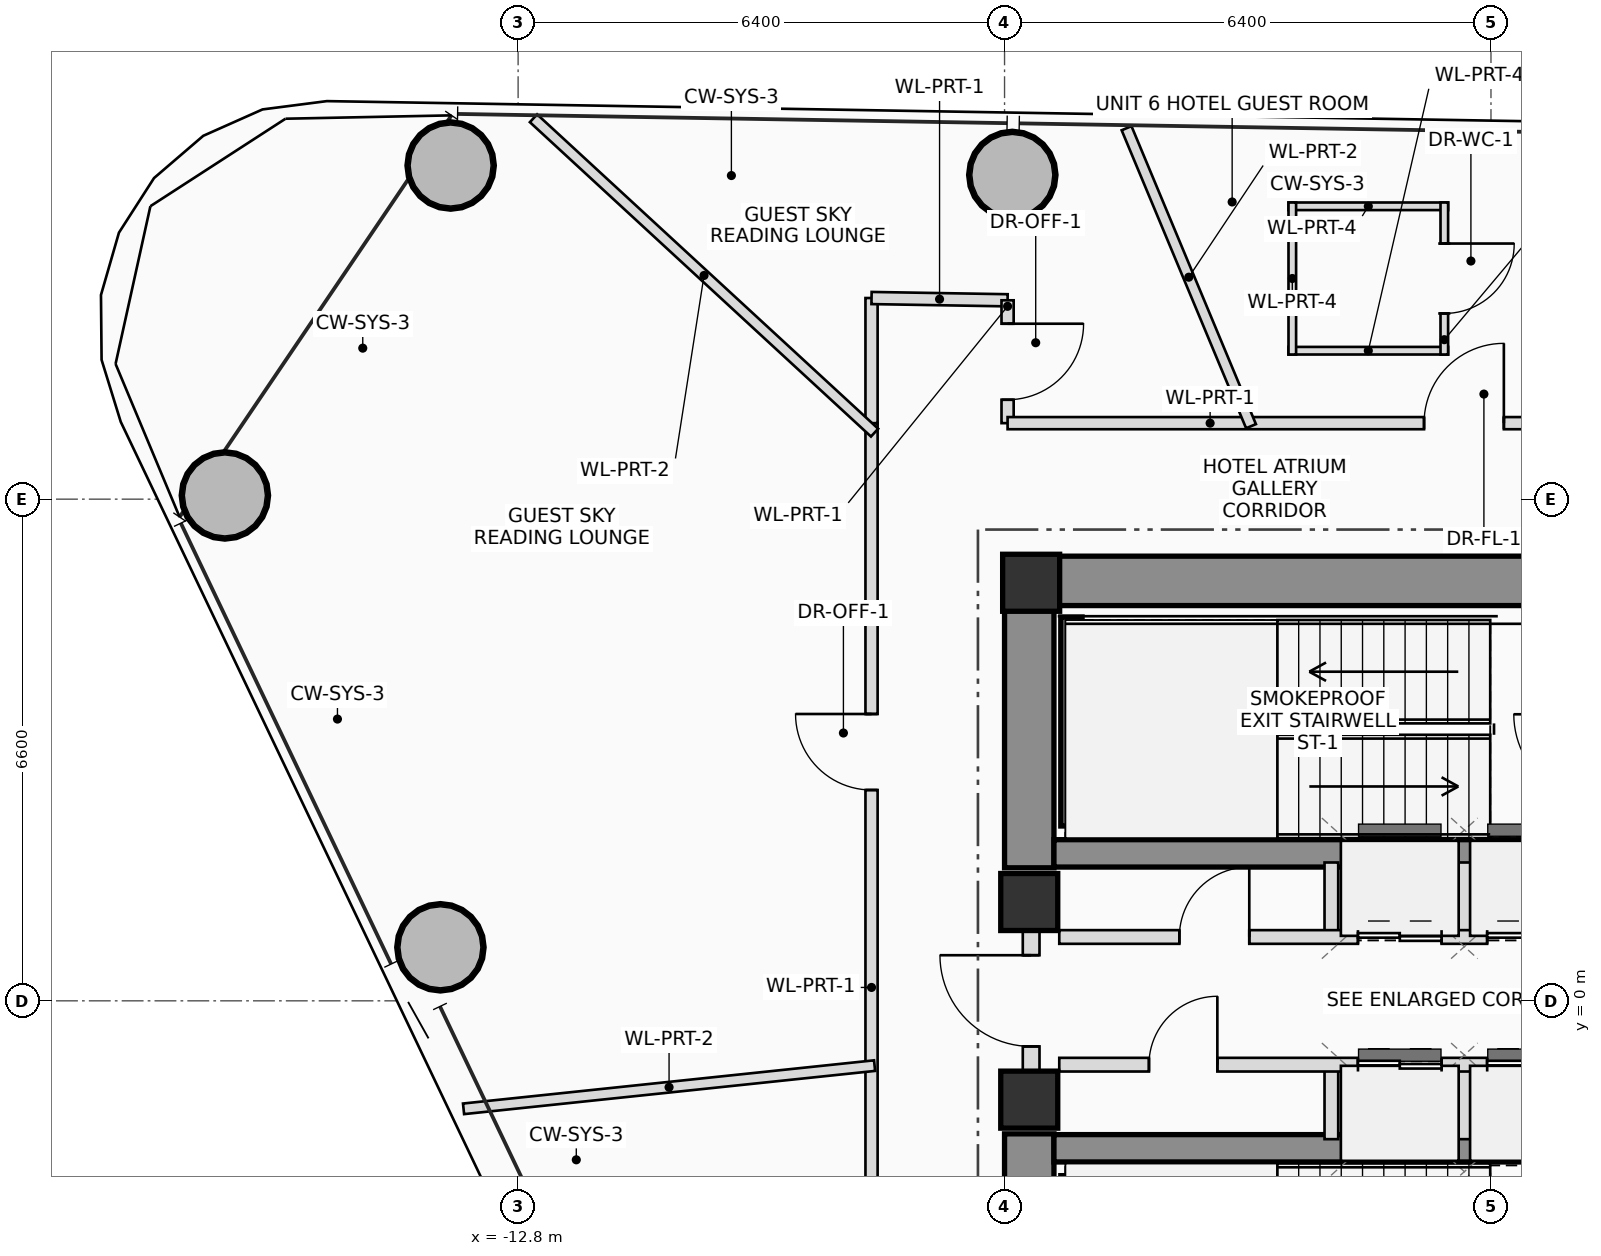
"""IFC4 building model, lengths in metres.
Left out: names, types, materials, properties, quantities, classifications, styles, units other than length and angle.
Written with IfcOpenShell. Run it as: python <this file> out.ifc"""

import sys

from ifc_helpers import new_model, si_unit, direction, frame, frame_2d, origin, origin_2d, place, context, subcontext, project, spatial, rectangle, hollow_circle, extrude, source, transform, mapped, element, fill, save


model = new_model("IFC4")
c1 = context("Model", 3, precision=1e-05, world=origin(), true_north=direction((0.0, 1.0)))
c2 = subcontext(c1, "Body", "Model", "MODEL_VIEW")
j1 = project(units=[si_unit("LENGTHUNIT", "METRE"), si_unit("PLANEANGLEUNIT", "RADIAN")], contexts=[c1])
p1 = place(None, origin())
s1 = spatial("IfcSite", under=j1, at=p1, CompositionType="ELEMENT")
p2 = place(p1, origin())
s2 = spatial("IfcBuilding", under=s1, at=p2, CompositionType="ELEMENT")
p3 = place(p2, frame((0.0, 0.0, 215.6)))
s3 = spatial("IfcBuildingStorey", under=s2, at=p3, CompositionType="ELEMENT", Elevation=215.6)
m1 = source(origin(), c2, "Body", "SweptSolid", [
    extrude(rectangle(XDim=0.75, YDim=0.75, at=origin_2d()), origin(), (0.0, 0.0, 1.0), 3.45),
])
p4 = place(p3, frame((-6.05, 5.5, 0.0), z_axis=(0.0, 0.0, 1.0), x_axis=(1.0, 0.0, 0.0)))
e1 = element("IfcColumn", 1, at=p4, inside=s3, PredefinedType="COLUMN", context=c2, shape_type="MappedRepresentation", body=[
    mapped(m1, transform((0.0, 0.0, 0.0), scale=1.0)),
])
p5 = place(p3, frame((-6.4, 5.525, 0.0), z_axis=(0.0, 0.0, 1.0), x_axis=(1.0, 0.0, 0.0)))
e2 = element("IfcWall", 2, at=p5, inside=s3, PredefinedType="SHEAR", context=c2, shape_type="SweptSolid", body=[
    extrude(rectangle(XDim=12.8, YDim=0.65, at=frame_2d((6.4, 0.0))), origin(), (0.0, 0.0, 1.0), 3.45),
])
p6 = place(p5, frame((8.6, 0.0, 0.0)))
e3 = element("IfcOpeningElement", 3, at=p6, cuts=e2, PredefinedType="OPENING", context=c2, shape_type="SweptSolid", body=[
    extrude(rectangle(XDim=1.2, YDim=2.2, at=frame_2d((0.6, 1.1))), frame((0.0, 0.335, 0.0), z_axis=(0.0, -1.0, 0.0), x_axis=(1.0, 0.0, 0.0)), (0.0, 0.0, 1.0), 0.67),
])
for number, where, z_axis, x_axis in (
    (4, (-6.075, -5.2, 0.0), (0.0, 0.0, 1.0), (0.0, 1.0, 0.0)),
    (5, (-6.075, 1.75, 0.0), (0.0, 0.0, 1.0), (0.0, 1.0, 0.0)),
):
    element("IfcWall", number, at=place(p3, frame(where, z_axis=z_axis, x_axis=x_axis)), inside=s3, PredefinedType="SHEAR", context=c2, shape_type="SweptSolid", body=[
        extrude(rectangle(XDim=3.45, YDim=0.65, at=frame_2d((1.725, 0.0))), origin(), (0.0, 0.0, 1.0), 3.45),
    ])
for number, where, z_axis, x_axis in (
    (6, (-5.75, 1.94, 0.0), (0.0, 0.0, 1.0), (1.0, 0.0, 0.0)),
    (7, (-5.75, -1.94, 0.0), (0.0, 0.0, 1.0), (1.0, 0.0, 0.0)),
):
    element("IfcWall", number, at=place(p3, frame(where, z_axis=z_axis, x_axis=x_axis)), inside=s3, PredefinedType="SHEAR", context=c2, shape_type="SweptSolid", body=[
        extrude(rectangle(XDim=11.5, YDim=0.36, at=frame_2d((5.75, 0.0))), origin(), (0.0, 0.0, 1.0), 3.45),
    ])
p7 = place(p3, frame((-5.52, 2.3, 0.0), z_axis=(0.0, 0.0, 1.0), x_axis=(0.0, 1.0, 0.0)))
e8 = element("IfcWall", 8, at=p7, inside=s3, PredefinedType="SHEAR", context=c2, shape_type="SweptSolid", body=[
    extrude(rectangle(XDim=2.75, YDim=0.28, at=frame_2d((1.375, 0.0))), origin(), (0.0, 0.0, 1.0), 3.45),
])
for number, where, z_axis, x_axis in (
    (9, (-6.075, -1.3, 0.0), (0.0, 0.0, 1.0), (1.0, 0.0, 0.0)),
    (10, (-6.075, 1.3, 0.0), (0.0, 0.0, 1.0), (1.0, 0.0, 0.0)),
):
    element("IfcColumn", number, at=place(p3, frame(where, z_axis=z_axis, x_axis=x_axis)), inside=s3, PredefinedType="COLUMN", context=c2, shape_type="MappedRepresentation", body=[
        mapped(m1, transform((0.0, 0.0, 0.0), scale=1.0)),
    ])
m2 = source(origin(), c2, "Body", "SweptSolid", [
    extrude(hollow_circle(Radius=0.575, WallThickness=0.042, at=origin_2d()), origin(), (0.0, 0.0, 1.0), 3.45),
])
for number, where, z_axis, x_axis in (
    (11, (-6.298, 10.865, 0.0), (0.0, 0.0, 1.0), (1.0, 0.0, 0.0)),
    (12, (-13.688, 10.99, 0.0), (0.0, 0.0, 1.0), (1.0, 0.0, 0.0)),
    (13, (-16.658, 6.649, 0.0), (0.0, 0.0, 1.0), (1.0, 0.0, 0.0)),
    (14, (-13.823, 0.704, 0.0), (0.0, 0.0, 1.0), (1.0, 0.0, 0.0)),
):
    element("IfcColumn", number, at=place(p3, frame(where, z_axis=z_axis, x_axis=x_axis)), inside=s3, PredefinedType="COLUMN", context=c2, shape_type="MappedRepresentation", body=[
        mapped(m2, transform((0.0, 0.0, 0.0), scale=1.0)),
    ])
p8 = place(p3, frame((-6.05, -0.95, 0.0), z_axis=(0.0, 0.0, 1.0), x_axis=(0.0, 1.0, 0.0)))
e15 = element("IfcWall", 15, at=p8, inside=s3, PredefinedType="PLUMBINGWALL", context=c2, shape_type="SweptSolid", body=[
    extrude(rectangle(XDim=1.9, YDim=0.22, at=frame_2d((0.95, 0.0))), origin(), (0.0, 0.0, 1.0), 2.19),
])
p9 = place(p8, frame((0.35, 0.0, 0.0)))
e16 = element("IfcOpeningElement", 16, at=p9, cuts=e15, PredefinedType="OPENING", context=c2, shape_type="SweptSolid", body=[
    extrude(rectangle(XDim=1.2, YDim=2.2, at=frame_2d((0.6, 1.1))), frame((0.0, 0.12, 0.0), z_axis=(0.0, -1.0, 0.0), x_axis=(1.0, 0.0, 0.0)), (0.0, 0.0, 1.0), 0.24),
])
for number, where, z_axis, x_axis in (
    (17, (-2.1, 0.84, 0.0), (0.0, 0.0, 1.0), (0.0, 1.0, 0.0)),
    (18, (-2.1, -1.82, 0.0), (0.0, 0.0, 1.0), (0.0, 1.0, 0.0)),
    (19, (-0.35, 0.84, 0.0), (0.0, 0.0, 1.0), (0.0, 1.0, 0.0)),
    (20, (-0.35, -1.82, 0.0), (0.0, 0.0, 1.0), (0.0, 1.0, 0.0)),
):
    element("IfcWall", number, at=place(p3, frame(where, z_axis=z_axis, x_axis=x_axis)), inside=s3, PredefinedType="PLUMBINGWALL", context=c2, shape_type="SweptSolid", body=[
        extrude(rectangle(XDim=0.98, YDim=0.18, at=frame_2d((0.49, 0.0))), origin(), (0.0, 0.0, 1.0), 3.21),
    ])
p10 = place(p3, frame((-5.68, 0.84, 0.0), z_axis=(0.0, 0.0, 1.0), x_axis=(1.0, 0.0, 0.0)))
e21 = element("IfcWall", 21, at=p10, inside=s3, PredefinedType="PLUMBINGWALL", context=c2, shape_type="SweptSolid", body=[
    extrude(rectangle(XDim=11.33, YDim=0.18, at=frame_2d((5.665, 0.0))), origin(), (0.0, 0.0, 1.0), 3.21),
])
p11 = place(p10, frame((1.58, 0.0, 0.0)))
e22 = element("IfcOpeningElement", 22, at=p11, cuts=e21, PredefinedType="OPENING", context=c2, shape_type="SweptSolid", body=[
    extrude(rectangle(XDim=0.92, YDim=2.1, at=frame_2d((0.46, 1.05))), frame((0.0, 0.1, 0.0), z_axis=(0.0, -1.0, 0.0), x_axis=(1.0, 0.0, 0.0)), (0.0, 0.0, 1.0), 0.2),
])
p12 = place(p10, frame((3.93, 0.0, 0.0)))
e23 = element("IfcOpeningElement", 23, at=p12, cuts=e21, PredefinedType="OPENING", context=c2, shape_type="SweptSolid", body=[
    extrude(rectangle(XDim=1.1, YDim=2.2, at=frame_2d((0.55, 1.1))), frame((0.0, 0.1, 0.0), z_axis=(0.0, -1.0, 0.0), x_axis=(1.0, 0.0, 0.0)), (0.0, 0.0, 1.0), 0.2),
])
p13 = place(p10, frame((5.63, 0.0, 0.0)))
e24 = element("IfcOpeningElement", 24, at=p13, cuts=e21, PredefinedType="OPENING", context=c2, shape_type="SweptSolid", body=[
    extrude(rectangle(XDim=1.1, YDim=2.2, at=frame_2d((0.55, 1.1))), frame((0.0, 0.1, 0.0), z_axis=(0.0, -1.0, 0.0), x_axis=(1.0, 0.0, 0.0)), (0.0, 0.0, 1.0), 0.2),
])
p14 = place(p10, frame((10.25, 0.0, 0.0)))
e25 = element("IfcOpeningElement", 25, at=p14, cuts=e21, PredefinedType="OPENING", context=c2, shape_type="SweptSolid", body=[
    extrude(rectangle(XDim=0.9, YDim=2.05, at=frame_2d((0.45, 1.025))), frame((0.0, 0.1, 0.0), z_axis=(0.0, -1.0, 0.0), x_axis=(1.0, 0.0, 0.0)), (0.0, 0.0, 1.0), 0.2),
])
p15 = place(p3, frame((-5.68, -0.84, 0.0), z_axis=(0.0, 0.0, 1.0), x_axis=(1.0, 0.0, 0.0)))
e26 = element("IfcWall", 26, at=p15, inside=s3, PredefinedType="PLUMBINGWALL", context=c2, shape_type="SweptSolid", body=[
    extrude(rectangle(XDim=11.33, YDim=0.18, at=frame_2d((5.665, 0.0))), origin(), (0.0, 0.0, 1.0), 3.21),
])
p16 = place(p15, frame((1.18, 0.0, 0.0)))
e27 = element("IfcOpeningElement", 27, at=p16, cuts=e26, PredefinedType="OPENING", context=c2, shape_type="SweptSolid", body=[
    extrude(rectangle(XDim=0.9, YDim=2.05, at=frame_2d((0.45, 1.025))), frame((0.0, 0.1, 0.0), z_axis=(0.0, -1.0, 0.0), x_axis=(1.0, 0.0, 0.0)), (0.0, 0.0, 1.0), 0.2),
])
p17 = place(p15, frame((3.93, 0.0, 0.0)))
e28 = element("IfcOpeningElement", 28, at=p17, cuts=e26, PredefinedType="OPENING", context=c2, shape_type="SweptSolid", body=[
    extrude(rectangle(XDim=1.1, YDim=2.2, at=frame_2d((0.55, 1.1))), frame((0.0, 0.1, 0.0), z_axis=(0.0, -1.0, 0.0), x_axis=(1.0, 0.0, 0.0)), (0.0, 0.0, 1.0), 0.2),
])
p18 = place(p15, frame((5.63, 0.0, 0.0)))
e29 = element("IfcOpeningElement", 29, at=p18, cuts=e26, PredefinedType="OPENING", context=c2, shape_type="SweptSolid", body=[
    extrude(rectangle(XDim=1.1, YDim=2.2, at=frame_2d((0.55, 1.1))), frame((0.0, 0.1, 0.0), z_axis=(0.0, -1.0, 0.0), x_axis=(1.0, 0.0, 0.0)), (0.0, 0.0, 1.0), 0.2),
])
p19 = place(p15, frame((8.9, 0.0, 0.0)))
e30 = element("IfcOpeningElement", 30, at=p19, cuts=e26, PredefinedType="OPENING", context=c2, shape_type="SweptSolid", body=[
    extrude(rectangle(XDim=0.9, YDim=2.05, at=frame_2d((0.45, 1.025))), frame((0.0, 0.1, 0.0), z_axis=(0.0, -1.0, 0.0), x_axis=(1.0, 0.0, 0.0)), (0.0, 0.0, 1.0), 0.2),
])
p20 = place(p15, frame((10.25, 0.0, 0.0)))
e31 = element("IfcOpeningElement", 31, at=p20, cuts=e26, PredefinedType="OPENING", context=c2, shape_type="SweptSolid", body=[
    extrude(rectangle(XDim=0.9, YDim=2.05, at=frame_2d((0.45, 1.025))), frame((0.0, 0.1, 0.0), z_axis=(0.0, -1.0, 0.0), x_axis=(1.0, 0.0, 0.0)), (0.0, 0.0, 1.0), 0.2),
])
for number, where, z_axis, x_axis in (
    (32, (-2.664, 10.453, 0.0), (0.0, 0.0, 1.0), (1.0, 0.0, 0.0)),
    (33, (-0.564, 8.553, 0.0), (0.0, 0.0, 1.0), (-1.0, 0.0, 0.0)),
):
    element("IfcWall", number, at=place(p3, frame(where, z_axis=z_axis, x_axis=x_axis)), inside=s3, PredefinedType="PARTITIONING", context=c2, shape_type="SweptSolid", body=[
        extrude(rectangle(XDim=2.1, YDim=0.1, at=frame_2d((1.05, 0.0))), origin(), (0.0, 0.0, 1.0), 3.21),
    ])
p21 = place(p3, frame((-0.614, 10.503, 0.0), z_axis=(0.0, 0.0, 1.0), x_axis=(0.0, -1.0, 0.0)))
e34 = element("IfcWall", 34, at=p21, inside=s3, PredefinedType="PARTITIONING", context=c2, shape_type="SweptSolid", body=[
    extrude(rectangle(XDim=2.0, YDim=0.1, at=frame_2d((1.0, 0.0))), origin(), (0.0, 0.0, 1.0), 2.865),
])
p22 = place(p21, frame((0.54, 0.0, 0.0)))
e35 = element("IfcOpeningElement", 35, at=p22, cuts=e34, PredefinedType="OPENING", context=c2, shape_type="SweptSolid", body=[
    extrude(rectangle(XDim=0.92, YDim=2.1, at=frame_2d((0.46, 1.05))), frame((0.0, 0.06, 0.0), z_axis=(0.0, -1.0, 0.0), x_axis=(1.0, 0.0, 0.0)), (0.0, 0.0, 1.0), 0.12),
])
p23 = place(p3, frame((-2.614, 8.503, 0.0), z_axis=(0.0, 0.0, 1.0), x_axis=(0.0, 1.0, 0.0)))
e36 = element("IfcWall", 36, at=p23, inside=s3, PredefinedType="PARTITIONING", context=c2, shape_type="SweptSolid", body=[
    extrude(rectangle(XDim=2.0, YDim=0.1, at=frame_2d((1.0, 0.0))), origin(), (0.0, 0.0, 1.0), 2.865),
])
p24 = place(p3, frame((-8.15, -7.355, 0.0), z_axis=(0.0, 0.0, 1.0), x_axis=(0.0, 1.0, 0.0)))
e37 = element("IfcWall", 37, at=p24, inside=s3, PredefinedType="PARTITIONING", context=c2, shape_type="SweptSolid", body=[
    extrude(rectangle(XDim=14.956, YDim=0.16, at=frame_2d((7.478, 0.0))), origin(), (0.0, 0.0, 1.0), 2.565),
])
p25 = place(p24, frame((4.034, 0.0, 0.0)))
e38 = element("IfcOpeningElement", 38, at=p25, cuts=e37, PredefinedType="OPENING", context=c2, shape_type="SweptSolid", body=[
    extrude(rectangle(XDim=0.9, YDim=2.05, at=frame_2d((0.45, 1.025))), frame((0.0, 0.09, 0.0), z_axis=(0.0, -1.0, 0.0), x_axis=(1.0, 0.0, 0.0)), (0.0, 0.0, 1.0), 0.18),
])
p26 = place(p24, frame((10.129, 0.0, 0.0)))
e39 = element("IfcOpeningElement", 39, at=p26, cuts=e37, PredefinedType="OPENING", context=c2, shape_type="SweptSolid", body=[
    extrude(rectangle(XDim=1.0, YDim=2.25, at=frame_2d((0.5, 1.125))), frame((0.0, 0.09, 0.0), z_axis=(0.0, -1.0, 0.0), x_axis=(1.0, 0.0, 0.0)), (0.0, 0.0, 1.0), 0.18),
])
p27 = place(p3, frame((-8.15, 7.6, 0.0), z_axis=(0.0, 0.0, 1.0), x_axis=(0.0, 1.0, 0.0)))
e40 = element("IfcWall", 40, at=p27, inside=s3, PredefinedType="PARTITIONING", context=c2, shape_type="SweptSolid", body=[
    extrude(rectangle(XDim=1.646, YDim=0.16, at=frame_2d((0.823, 0.0))), origin(), (0.0, 0.0, 1.0), 2.765),
])
p28 = place(p3, frame((-8.15, 9.246, 0.0), z_axis=(0.0, 0.0, 1.0), x_axis=(0.999859277964, -0.016775704705, 0.0)))
e41 = element("IfcWall", 41, at=p28, inside=s3, PredefinedType="PARTITIONING", context=c2, shape_type="SweptSolid", body=[
    extrude(rectangle(XDim=1.79, YDim=0.16, at=frame_2d((0.895, 0.0))), origin(), (0.0, 0.0, 1.0), 2.865),
])
p29 = place(p3, frame((-6.36, 9.216, 0.0), z_axis=(0.0, 0.0, 1.0), x_axis=(0.0, -1.0, 0.0)))
e42 = element("IfcWall", 42, at=p29, inside=s3, PredefinedType="PARTITIONING", context=c2, shape_type="SweptSolid", body=[
    extrude(rectangle(XDim=1.616, YDim=0.16, at=frame_2d((0.808, 0.0))), origin(), (0.0, 0.0, 1.0), 2.565),
])
p30 = place(p29, frame((0.308, 0.0, 0.0)))
e43 = element("IfcOpeningElement", 43, at=p30, cuts=e42, PredefinedType="OPENING", context=c2, shape_type="SweptSolid", body=[
    extrude(rectangle(XDim=1.0, YDim=2.25, at=frame_2d((0.5, 1.125))), frame((0.0, 0.09, 0.0), z_axis=(0.0, -1.0, 0.0), x_axis=(1.0, 0.0, 0.0)), (0.0, 0.0, 1.0), 0.18),
])
p31 = place(p3, frame((-6.36, 7.6, 0.0), z_axis=(0.0, 0.0, 1.0), x_axis=(1.0, 0.0, 0.0)))
e44 = element("IfcWall", 44, at=p31, inside=s3, PredefinedType="PARTITIONING", context=c2, shape_type="SweptSolid", body=[
    extrude(rectangle(XDim=11.61, YDim=0.16, at=frame_2d((5.805, 0.0))), origin(), (0.0, 0.0, 1.0), 2.565),
])
p32 = place(p31, frame((5.479, 0.0, 0.0)))
e45 = element("IfcOpeningElement", 45, at=p32, cuts=e44, PredefinedType="OPENING", context=c2, shape_type="SweptSolid", body=[
    extrude(rectangle(XDim=1.05, YDim=2.2, at=frame_2d((0.525, 1.1))), frame((0.0, 0.09, 0.0), z_axis=(0.0, -1.0, 0.0), x_axis=(1.0, 0.0, 0.0)), (0.0, 0.0, 1.0), 0.18),
])
p33 = place(p31, frame((9.641, 0.0, 0.0)))
e46 = element("IfcOpeningElement", 46, at=p33, cuts=e44, PredefinedType="OPENING", context=c2, shape_type="SweptSolid", body=[
    extrude(rectangle(XDim=1.0, YDim=2.25, at=frame_2d((0.5, 1.125))), frame((0.0, 0.09, 0.0), z_axis=(0.0, -1.0, 0.0), x_axis=(1.0, 0.0, 0.0)), (0.0, 0.0, 1.0), 0.18),
])
p34 = place(p3, frame((-3.157, 7.56, 0.0), z_axis=(0.0, 0.0, 1.0), x_axis=(-0.38535788012, 0.922767199368, 0.0)))
e47 = element("IfcWall", 47, at=p34, inside=s3, PredefinedType="PARTITIONING", context=c2, shape_type="SweptSolid", body=[
    extrude(rectangle(XDim=4.249, YDim=0.14, at=frame_2d((2.124, 0.0))), origin(), (0.0, 0.0, 1.0), 2.725),
])
p35 = place(p3, frame((-8.11, 7.475, 0.0), z_axis=(0.0, 0.0, 1.0), x_axis=(-0.735323159751, 0.67771664487, 0.0)))
e48 = element("IfcWall", 48, at=p35, inside=s3, PredefinedType="PARTITIONING", context=c2, shape_type="SweptSolid", body=[
    extrude(rectangle(XDim=6.103, YDim=0.14, at=frame_2d((3.051, 0.0))), origin(), (0.0, 0.0, 1.0), 2.725),
])
p36 = place(p3, frame((-8.11, -0.852, 0.0), z_axis=(0.0, 0.0, 1.0), x_axis=(-0.994517501458, -0.104570260086, 0.0)))
e49 = element("IfcWall", 49, at=p36, inside=s3, PredefinedType="PARTITIONING", context=c2, shape_type="SweptSolid", body=[
    extrude(rectangle(XDim=5.438, YDim=0.14, at=frame_2d((2.719, 0.0))), origin(), (0.0, 0.0, 1.0), 2.725),
])
p37 = place(p9, origin())
e50 = element("IfcDoor", 50, at=p37, inside=s3, OperationType="SINGLE_SWING_RIGHT", PredefinedType="DOOR", context=c2, shape_type="SweptSolid", body=[
    extrude(rectangle(XDim=1.2, YDim=2.2, at=frame_2d((0.6, 1.1))), frame((0.0, 0.025, 0.0), z_axis=(0.0, -1.0, 0.0), x_axis=(1.0, 0.0, 0.0)), (0.0, 0.0, 1.0), 0.05),
])
fill(e16, e50)
p38 = place(p11, origin())
e51 = element("IfcDoor", 51, at=p38, inside=s3, OperationType="SINGLE_SWING_RIGHT", PredefinedType="DOOR", context=c2, shape_type="SweptSolid", body=[
    extrude(rectangle(XDim=0.92, YDim=2.1, at=frame_2d((0.46, 1.05))), frame((0.0, 0.025, 0.0), z_axis=(0.0, -1.0, 0.0), x_axis=(1.0, 0.0, 0.0)), (0.0, 0.0, 1.0), 0.05),
])
fill(e22, e51)
p39 = place(p12, origin())
e52 = element("IfcDoor", 52, at=p39, inside=s3, OperationType="DOUBLE_DOOR_SLIDING", PredefinedType="DOOR", context=c2, shape_type="SweptSolid", body=[
    extrude(rectangle(XDim=1.1, YDim=2.2, at=frame_2d((0.55, 1.1))), frame((0.0, 0.025, 0.0), z_axis=(0.0, -1.0, 0.0), x_axis=(1.0, 0.0, 0.0)), (0.0, 0.0, 1.0), 0.05),
])
fill(e23, e52)
p40 = place(p13, origin())
e53 = element("IfcDoor", 53, at=p40, inside=s3, OperationType="DOUBLE_DOOR_SLIDING", PredefinedType="DOOR", context=c2, shape_type="SweptSolid", body=[
    extrude(rectangle(XDim=1.1, YDim=2.2, at=frame_2d((0.55, 1.1))), frame((0.0, 0.025, 0.0), z_axis=(0.0, -1.0, 0.0), x_axis=(1.0, 0.0, 0.0)), (0.0, 0.0, 1.0), 0.05),
])
fill(e24, e53)
p41 = place(p16, origin())
e54 = element("IfcDoor", 54, at=p41, inside=s3, OperationType="SINGLE_SWING_RIGHT", PredefinedType="DOOR", context=c2, shape_type="SweptSolid", body=[
    extrude(rectangle(XDim=0.9, YDim=2.05, at=frame_2d((0.45, 1.025))), frame((0.0, 0.025, 0.0), z_axis=(0.0, -1.0, 0.0), x_axis=(1.0, 0.0, 0.0)), (0.0, 0.0, 1.0), 0.05),
])
fill(e27, e54)
p42 = place(p17, origin())
e55 = element("IfcDoor", 55, at=p42, inside=s3, OperationType="DOUBLE_DOOR_SLIDING", PredefinedType="DOOR", context=c2, shape_type="SweptSolid", body=[
    extrude(rectangle(XDim=1.1, YDim=2.2, at=frame_2d((0.55, 1.1))), frame((0.0, 0.025, 0.0), z_axis=(0.0, -1.0, 0.0), x_axis=(1.0, 0.0, 0.0)), (0.0, 0.0, 1.0), 0.05),
])
fill(e28, e55)
p43 = place(p18, origin())
e56 = element("IfcDoor", 56, at=p43, inside=s3, OperationType="DOUBLE_DOOR_SLIDING", PredefinedType="DOOR", context=c2, shape_type="SweptSolid", body=[
    extrude(rectangle(XDim=1.1, YDim=2.2, at=frame_2d((0.55, 1.1))), frame((0.0, 0.025, 0.0), z_axis=(0.0, -1.0, 0.0), x_axis=(1.0, 0.0, 0.0)), (0.0, 0.0, 1.0), 0.05),
])
fill(e29, e56)
p44 = place(p22, origin())
e57 = element("IfcDoor", 57, at=p44, inside=s3, OperationType="SINGLE_SWING_LEFT", PredefinedType="DOOR", context=c2, shape_type="SweptSolid", body=[
    extrude(rectangle(XDim=0.92, YDim=2.1, at=frame_2d((0.46, 1.05))), frame((0.0, 0.025, 0.0), z_axis=(0.0, -1.0, 0.0), x_axis=(1.0, 0.0, 0.0)), (0.0, 0.0, 1.0), 0.05),
])
fill(e35, e57)
p45 = place(p26, origin())
e58 = element("IfcDoor", 58, at=p45, inside=s3, OperationType="SINGLE_SWING_RIGHT", PredefinedType="DOOR", context=c2, shape_type="SweptSolid", body=[
    extrude(rectangle(XDim=1.0, YDim=2.25, at=frame_2d((0.5, 1.125))), frame((0.0, 0.025, 0.0), z_axis=(0.0, -1.0, 0.0), x_axis=(1.0, 0.0, 0.0)), (0.0, 0.0, 1.0), 0.05),
])
fill(e39, e58)
p46 = place(p30, origin())
e59 = element("IfcDoor", 59, at=p46, inside=s3, OperationType="SINGLE_SWING_LEFT", PredefinedType="DOOR", context=c2, shape_type="SweptSolid", body=[
    extrude(rectangle(XDim=1.0, YDim=2.25, at=frame_2d((0.5, 1.125))), frame((0.0, 0.025, 0.0), z_axis=(0.0, -1.0, 0.0), x_axis=(1.0, 0.0, 0.0)), (0.0, 0.0, 1.0), 0.05),
])
fill(e43, e59)
p47 = place(p32, origin())
e60 = element("IfcDoor", 60, at=p47, inside=s3, OperationType="SINGLE_SWING_RIGHT", PredefinedType="DOOR", context=c2, shape_type="SweptSolid", body=[
    extrude(rectangle(XDim=1.05, YDim=2.2, at=frame_2d((0.525, 1.1))), frame((0.0, 0.025, 0.0), z_axis=(0.0, -1.0, 0.0), x_axis=(1.0, 0.0, 0.0)), (0.0, 0.0, 1.0), 0.05),
])
fill(e45, e60)
save(model, sys.argv[1])
